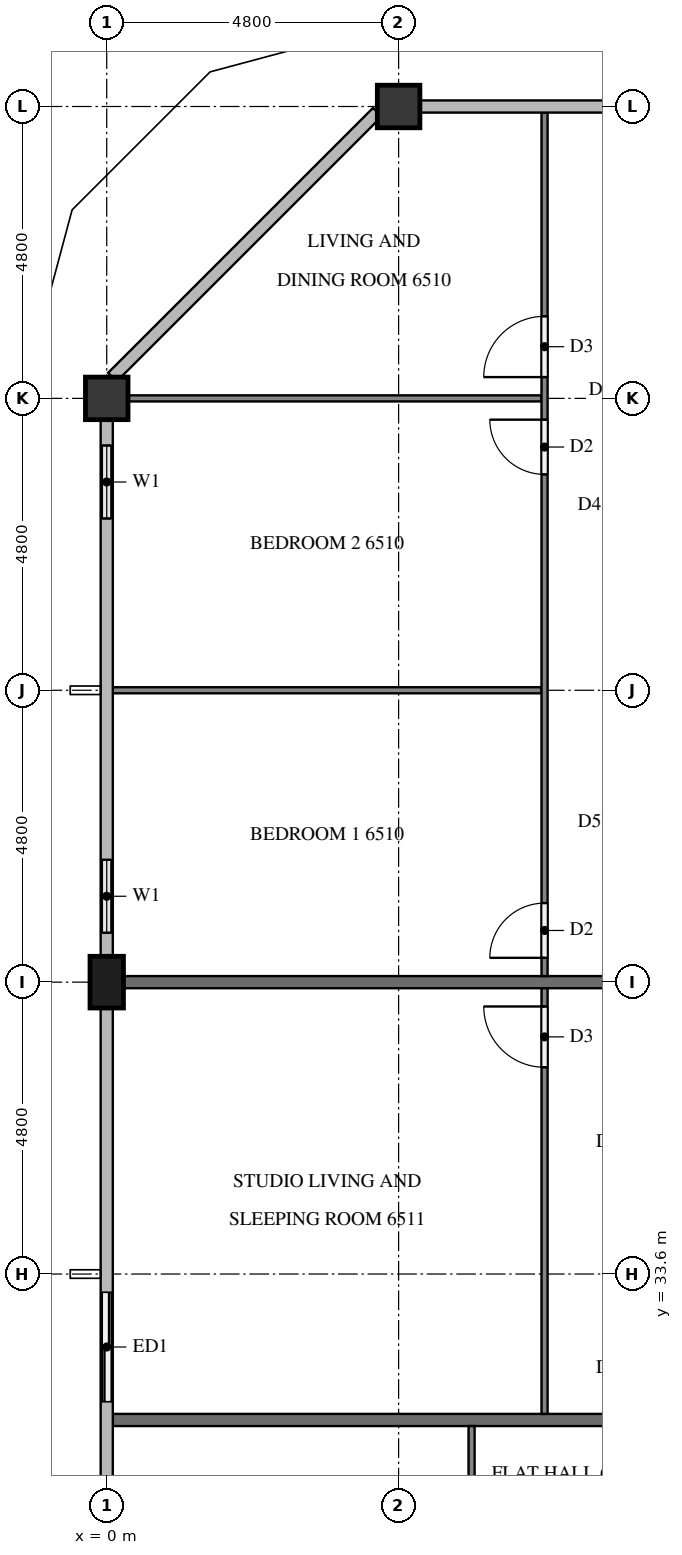
"""IFC4 building model, lengths in metres.
Left out: names, types, materials, properties, quantities, classifications, styles, units other than length and angle.
Written with IfcOpenShell. Run it as: python <this file> out.ifc"""

import sys

from ifc_helpers import new_model, si_unit, direction, frame, frame_2d, origin, origin_2d, place, context, subcontext, project, spatial, rectangle, extrude, element, fill, save


model = new_model("IFC4")
c1 = context("Model", 3, precision=1e-05, world=origin(), true_north=direction((0.0, 1.0)))
c2 = subcontext(c1, "Body", "Model", "MODEL_VIEW")
j1 = project(units=[si_unit("LENGTHUNIT", "METRE"), si_unit("PLANEANGLEUNIT", "RADIAN")], contexts=[c1])
p1 = place(None, origin())
s1 = spatial("IfcSite", under=j1, at=p1, CompositionType="ELEMENT")
p2 = place(p1, origin())
s2 = spatial("IfcBuilding", under=s1, at=p2, CompositionType="ELEMENT")
p3 = place(p2, frame((0.0, 0.0, 249.2)))
s3 = spatial("IfcBuildingStorey", under=s2, at=p3, CompositionType="ELEMENT", Elevation=249.2)
for number, where, z_axis, x_axis in (
    (1, (4.8, 52.8, 0.0), (0.0, 0.0, 1.0), (1.0, 0.0, 0.0)),
    (2, (0.0, 48.0, 0.0), (0.0, 0.0, 1.0), (1.0, 0.0, 0.0)),
):
    element("IfcColumn", number, at=place(p3, frame(where, z_axis=z_axis, x_axis=x_axis)), inside=s3, PredefinedType="COLUMN", context=c2, shape_type="SweptSolid", body=[
        extrude(rectangle(XDim=0.7, YDim=0.7, at=origin_2d()), origin(), (0.0, 0.0, 1.0), 3.2),
    ])
p4 = place(p3, frame((0.0, 38.4, 0.0), z_axis=(0.0, 0.0, 1.0), x_axis=(0.0, 1.0, 0.0)))
e3 = element("IfcColumn", 3, at=p4, inside=s3, PredefinedType="COLUMN", context=c2, shape_type="SweptSolid", body=[
    extrude(rectangle(XDim=0.85, YDim=0.55, at=origin_2d()), origin(), (0.0, 0.0, 1.0), 3.2),
])
p5 = place(p3, frame((0.0, 47.65, 0.0), z_axis=(0.0, 0.0, 1.0), x_axis=(0.0, -1.0, 0.0)))
e4 = element("IfcWall", 4, at=p5, inside=s3, PredefinedType="SOLIDWALL", context=c2, shape_type="SweptSolid", body=[
    extrude(rectangle(XDim=2.05, YDim=0.15, at=frame_2d((1.025, 0.0))), origin(), (0.0, 0.0, 1.0), 3.2),
])
p6 = place(p5, frame((0.425, 0.0, 0.9)))
e5 = element("IfcOpeningElement", 5, at=p6, cuts=e4, PredefinedType="OPENING", context=c2, shape_type="SweptSolid", body=[
    extrude(rectangle(XDim=1.2, YDim=1.4, at=frame_2d((0.6, 0.7))), frame((0.0, 0.085, 0.0), z_axis=(0.0, -1.0, 0.0), x_axis=(1.0, 0.0, 0.0)), (0.0, 0.0, 1.0), 0.17),
])
p7 = place(p3, frame((0.0, 40.8, 0.0), z_axis=(0.0, 0.0, 1.0), x_axis=(0.0, -1.0, 0.0)))
e6 = element("IfcWall", 6, at=p7, inside=s3, PredefinedType="SOLIDWALL", context=c2, shape_type="SweptSolid", body=[
    extrude(rectangle(XDim=1.975, YDim=0.15, at=frame_2d((0.988, 0.0))), origin(), (0.0, 0.0, 1.0), 3.2),
])
p8 = place(p7, frame((0.387, 0.0, 0.9)))
e7 = element("IfcOpeningElement", 7, at=p8, cuts=e6, PredefinedType="OPENING", context=c2, shape_type="SweptSolid", body=[
    extrude(rectangle(XDim=1.2, YDim=1.4, at=frame_2d((0.6, 0.7))), frame((0.0, 0.085, 0.0), z_axis=(0.0, -1.0, 0.0), x_axis=(1.0, 0.0, 0.0)), (0.0, 0.0, 1.0), 0.17),
])
p9 = place(p3, frame((0.0, 33.6, 0.0), z_axis=(0.0, 0.0, 1.0), x_axis=(0.0, -1.0, 0.0)))
e8 = element("IfcWall", 8, at=p9, inside=s3, PredefinedType="SOLIDWALL", context=c2, shape_type="SweptSolid", body=[
    extrude(rectangle(XDim=2.4, YDim=0.15, at=frame_2d((1.2, 0.0))), origin(), (0.0, 0.0, 1.0), 3.2),
])
p10 = place(p9, frame((0.3, 0.0, 0.0)))
e9 = element("IfcOpeningElement", 9, at=p10, cuts=e8, PredefinedType="OPENING", context=c2, shape_type="SweptSolid", body=[
    extrude(rectangle(XDim=1.8, YDim=2.4, at=frame_2d((0.9, 1.2))), frame((0.0, 0.085, 0.0), z_axis=(0.0, -1.0, 0.0), x_axis=(1.0, 0.0, 0.0)), (0.0, 0.0, 1.0), 0.17),
])
p11 = place(p3, frame((0.275, 38.4, 0.0), z_axis=(0.0, 0.0, 1.0), x_axis=(1.0, 0.0, 0.0)))
e10 = element("IfcWall", 10, at=p11, inside=s3, PredefinedType="PARTITIONING", context=c2, shape_type="SweptSolid", body=[
    extrude(rectangle(XDim=11.625, YDim=0.2, at=frame_2d((5.812, 0.0))), origin(), (0.0, 0.0, 1.0), 3.2),
])
p12 = place(p3, frame((0.1, 31.2, 0.0), z_axis=(0.0, 0.0, 1.0), x_axis=(1.0, 0.0, 0.0)))
e11 = element("IfcWall", 11, at=p12, inside=s3, PredefinedType="PARTITIONING", context=c2, shape_type="SweptSolid", body=[
    extrude(rectangle(XDim=11.8, YDim=0.2, at=frame_2d((5.9, 0.0))), origin(), (0.0, 0.0, 1.0), 3.2),
])
p13 = place(p3, frame((7.15, 43.2, 0.0), z_axis=(0.0, 0.0, 1.0), x_axis=(-1.0, 0.0, 0.0)))
e12 = element("IfcWall", 12, at=p13, inside=s3, PredefinedType="PARTITIONING", context=c2, shape_type="SweptSolid", body=[
    extrude(rectangle(XDim=7.05, YDim=0.1, at=frame_2d((3.525, 0.0))), origin(), (0.0, 0.0, 1.0), 3.2),
])
p14 = place(p3, frame((7.15, 48.0, 0.0), z_axis=(0.0, 0.0, 1.0), x_axis=(-1.0, 0.0, 0.0)))
e13 = element("IfcWall", 13, at=p14, inside=s3, PredefinedType="PARTITIONING", context=c2, shape_type="SweptSolid", body=[
    extrude(rectangle(XDim=6.8, YDim=0.1, at=frame_2d((3.4, 0.0))), origin(), (0.0, 0.0, 1.0), 3.2),
])
p15 = place(p3, frame((7.2, 38.5, 0.0), z_axis=(0.0, 0.0, 1.0), x_axis=(0.0, 1.0, 0.0)))
e14 = element("IfcWall", 14, at=p15, inside=s3, PredefinedType="PARTITIONING", context=c2, shape_type="SweptSolid", body=[
    extrude(rectangle(XDim=14.2, YDim=0.1, at=frame_2d((7.1, 0.0))), origin(), (0.0, 0.0, 1.0), 3.2),
])
p16 = place(p15, frame((0.3, 0.0, 0.0)))
e15 = element("IfcOpeningElement", 15, at=p16, cuts=e14, PredefinedType="OPENING", context=c2, shape_type="SweptSolid", body=[
    extrude(rectangle(XDim=0.9, YDim=2.1, at=frame_2d((0.45, 1.05))), frame((0.0, 0.06, 0.0), z_axis=(0.0, -1.0, 0.0), x_axis=(1.0, 0.0, 0.0)), (0.0, 0.0, 1.0), 0.12),
])
p17 = place(p15, frame((8.25, 0.0, 0.0)))
e16 = element("IfcOpeningElement", 16, at=p17, cuts=e14, PredefinedType="OPENING", context=c2, shape_type="SweptSolid", body=[
    extrude(rectangle(XDim=0.9, YDim=2.1, at=frame_2d((0.45, 1.05))), frame((0.0, 0.06, 0.0), z_axis=(0.0, -1.0, 0.0), x_axis=(1.0, 0.0, 0.0)), (0.0, 0.0, 1.0), 0.12),
])
p18 = place(p15, frame((9.85, 0.0, 0.0)))
e17 = element("IfcOpeningElement", 17, at=p18, cuts=e14, PredefinedType="OPENING", context=c2, shape_type="SweptSolid", body=[
    extrude(rectangle(XDim=1.0, YDim=2.1, at=frame_2d((0.5, 1.05))), frame((0.0, 0.06, 0.0), z_axis=(0.0, -1.0, 0.0), x_axis=(1.0, 0.0, 0.0)), (0.0, 0.0, 1.0), 0.12),
])
p19 = place(p3, frame((7.2, 31.3, 0.0), z_axis=(0.0, 0.0, 1.0), x_axis=(0.0, 1.0, 0.0)))
e18 = element("IfcWall", 18, at=p19, inside=s3, PredefinedType="PARTITIONING", context=c2, shape_type="SweptSolid", body=[
    extrude(rectangle(XDim=7.0, YDim=0.1, at=frame_2d((3.5, 0.0))), origin(), (0.0, 0.0, 1.0), 3.2),
])
p20 = place(p19, frame((5.7, 0.0, 0.0)))
e19 = element("IfcOpeningElement", 19, at=p20, cuts=e18, PredefinedType="OPENING", context=c2, shape_type="SweptSolid", body=[
    extrude(rectangle(XDim=1.0, YDim=2.1, at=frame_2d((0.5, 1.05))), frame((0.0, 0.06, 0.0), z_axis=(0.0, -1.0, 0.0), x_axis=(1.0, 0.0, 0.0)), (0.0, 0.0, 1.0), 0.12),
])
p21 = place(p3, frame((6.0, 24.1, 0.0), z_axis=(0.0, 0.0, 1.0), x_axis=(0.0, 1.0, 0.0)))
e20 = element("IfcWall", 20, at=p21, inside=s3, PredefinedType="PARTITIONING", context=c2, shape_type="SweptSolid", body=[
    extrude(rectangle(XDim=7.0, YDim=0.1, at=frame_2d((3.5, 0.0))), origin(), (0.0, 0.0, 1.0), 3.2),
])
p22 = place(p21, frame((0.3, 0.0, 0.0)))
e21 = element("IfcOpeningElement", 21, at=p22, cuts=e20, PredefinedType="OPENING", context=c2, shape_type="SweptSolid", body=[
    extrude(rectangle(XDim=1.0, YDim=2.1, at=frame_2d((0.5, 1.05))), frame((0.0, 0.06, 0.0), z_axis=(0.0, -1.0, 0.0), x_axis=(1.0, 0.0, 0.0)), (0.0, 0.0, 1.0), 0.12),
])
p23 = place(p6, origin())
e22 = element("IfcWindow", 22, at=p23, inside=s3, PartitioningType="SINGLE_PANEL", PredefinedType="WINDOW", context=c2, shape_type="SweptSolid", body=[
    extrude(rectangle(XDim=1.2, YDim=1.4, at=frame_2d((0.6, 0.7))), frame((0.0, 0.03, 0.0), z_axis=(0.0, -1.0, 0.0), x_axis=(1.0, 0.0, 0.0)), (0.0, 0.0, 1.0), 0.06),
])
fill(e5, e22)
p24 = place(p8, origin())
e23 = element("IfcWindow", 23, at=p24, inside=s3, PartitioningType="SINGLE_PANEL", PredefinedType="WINDOW", context=c2, shape_type="SweptSolid", body=[
    extrude(rectangle(XDim=1.2, YDim=1.4, at=frame_2d((0.6, 0.7))), frame((0.0, 0.03, 0.0), z_axis=(0.0, -1.0, 0.0), x_axis=(1.0, 0.0, 0.0)), (0.0, 0.0, 1.0), 0.06),
])
fill(e7, e23)
p25 = place(p10, origin())
e24 = element("IfcDoor", 24, at=p25, inside=s3, OperationType="SLIDING_TO_RIGHT", PredefinedType="DOOR", context=c2, shape_type="SweptSolid", body=[
    extrude(rectangle(XDim=1.8, YDim=2.4, at=frame_2d((0.9, 1.2))), frame((0.0, 0.025, 0.0), z_axis=(0.0, -1.0, 0.0), x_axis=(1.0, 0.0, 0.0)), (0.0, 0.0, 1.0), 0.05),
])
fill(e9, e24)
p26 = place(p16, origin())
e25 = element("IfcDoor", 25, at=p26, inside=s3, OperationType="SINGLE_SWING_LEFT", PredefinedType="DOOR", context=c2, shape_type="SweptSolid", body=[
    extrude(rectangle(XDim=0.9, YDim=2.1, at=frame_2d((0.45, 1.05))), frame((0.0, 0.025, 0.0), z_axis=(0.0, -1.0, 0.0), x_axis=(1.0, 0.0, 0.0)), (0.0, 0.0, 1.0), 0.05),
])
fill(e15, e25)
p27 = place(p17, origin())
e26 = element("IfcDoor", 26, at=p27, inside=s3, OperationType="SINGLE_SWING_RIGHT", PredefinedType="DOOR", context=c2, shape_type="SweptSolid", body=[
    extrude(rectangle(XDim=0.9, YDim=2.1, at=frame_2d((0.45, 1.05))), frame((0.0, 0.025, 0.0), z_axis=(0.0, -1.0, 0.0), x_axis=(1.0, 0.0, 0.0)), (0.0, 0.0, 1.0), 0.05),
])
fill(e16, e26)
p28 = place(p18, origin())
e27 = element("IfcDoor", 27, at=p28, inside=s3, OperationType="SINGLE_SWING_LEFT", PredefinedType="DOOR", context=c2, shape_type="SweptSolid", body=[
    extrude(rectangle(XDim=1.0, YDim=2.1, at=frame_2d((0.5, 1.05))), frame((0.0, 0.025, 0.0), z_axis=(0.0, -1.0, 0.0), x_axis=(1.0, 0.0, 0.0)), (0.0, 0.0, 1.0), 0.05),
])
fill(e17, e27)
p29 = place(p20, origin())
e28 = element("IfcDoor", 28, at=p29, inside=s3, OperationType="SINGLE_SWING_RIGHT", PredefinedType="DOOR", context=c2, shape_type="SweptSolid", body=[
    extrude(rectangle(XDim=1.0, YDim=2.1, at=frame_2d((0.5, 1.05))), frame((0.0, 0.025, 0.0), z_axis=(0.0, -1.0, 0.0), x_axis=(1.0, 0.0, 0.0)), (0.0, 0.0, 1.0), 0.05),
])
fill(e19, e28)
save(model, sys.argv[1])
